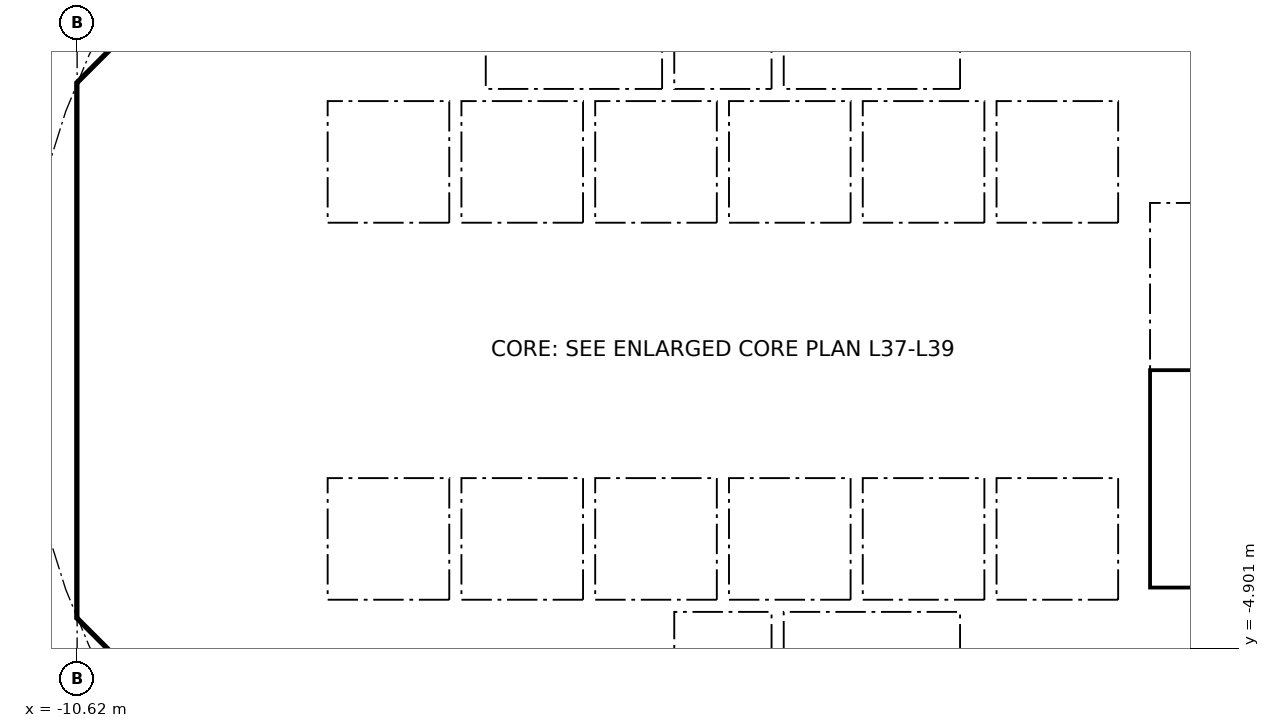
"""IFC4 building model, lengths in metres.
Left out: names, types, materials, properties, quantities, classifications, styles, units other than length and angle.
Written with IfcOpenShell. Run it as: python <this file> out.ifc"""

import sys

from ifc_helpers import new_model, si_unit, direction, frame, frame_2d, origin, place, context, subcontext, project, spatial, polyline, rectangle, outline, extrude, element, fill, save


model = new_model("IFC4")
c1 = context("Model", 3, precision=1e-05, world=origin(), true_north=direction((0.0, 1.0)))
c2 = subcontext(c1, "Body", "Model", "MODEL_VIEW")
j1 = project(units=[si_unit("LENGTHUNIT", "METRE"), si_unit("PLANEANGLEUNIT", "RADIAN")], contexts=[c1])
p1 = place(None, origin())
s1 = spatial("IfcSite", under=j1, at=p1, CompositionType="ELEMENT")
p2 = place(p1, origin())
s2 = spatial("IfcBuilding", under=s1, at=p2, CompositionType="ELEMENT")
p3 = place(p2, frame((0.0, 0.0, 149.2)))
s3 = spatial("IfcBuildingStorey", under=s2, at=p3, CompositionType="ELEMENT", Elevation=149.2)
p4 = place(p3, frame((9.988, 4.613, 0.0), z_axis=(0.0, 0.0, 1.0), x_axis=(-0.707106781187, 0.707106781187, 0.0)))
e1 = element("IfcWall", 1, at=p4, inside=s3, PredefinedType="SHEAR", context=c2, shape_type="SweptSolid", body=[
    extrude(rectangle(XDim=7.602, YDim=0.6, at=frame_2d((3.801, 0.0))), origin(), (0.0, 0.0, 1.0), 3.44),
])
p5 = place(p4, frame((3.201, 0.0, 0.0)))
e2 = element("IfcOpeningElement", 2, at=p5, cuts=e1, PredefinedType="OPENING", context=c2, shape_type="SweptSolid", body=[
    extrude(rectangle(XDim=1.2, YDim=2.1, at=frame_2d((0.6, 1.05))), frame((0.0, 0.31, 0.0), z_axis=(0.0, -1.0, 0.0), x_axis=(1.0, 0.0, 0.0)), (0.0, 0.0, 1.0), 0.62),
])
p6 = place(p3, frame((-4.613, 9.988, 0.0), z_axis=(0.0, 0.0, 1.0), x_axis=(-0.707106781187, -0.707106781187, 0.0)))
e3 = element("IfcWall", 3, at=p6, inside=s3, PredefinedType="SHEAR", context=c2, shape_type="SweptSolid", body=[
    extrude(rectangle(XDim=7.602, YDim=0.6, at=frame_2d((3.801, 0.0))), origin(), (0.0, 0.0, 1.0), 3.44),
])
p7 = place(p6, frame((0.351, 0.0, 0.0)))
e4 = element("IfcOpeningElement", 4, at=p7, cuts=e3, PredefinedType="OPENING", context=c2, shape_type="SweptSolid", body=[
    extrude(rectangle(XDim=1.1, YDim=2.1, at=frame_2d((0.55, 1.05))), frame((0.0, 0.31, 0.0), z_axis=(0.0, -1.0, 0.0), x_axis=(1.0, 0.0, 0.0)), (0.0, 0.0, 1.0), 0.62),
])
p8 = place(p3, frame((-10.325, 3.801, 0.0), z_axis=(0.0, 0.0, 1.0), x_axis=(0.0, -1.0, 0.0)))
e5 = element("IfcWall", 5, at=p8, inside=s3, PredefinedType="SHEAR", context=c2, shape_type="SweptSolid", body=[
    extrude(rectangle(XDim=7.602, YDim=0.6, at=frame_2d((3.801, 0.0))), origin(), (0.0, 0.0, 1.0), 3.44),
])
p9 = place(p8, frame((0.651, 0.0, 0.0)))
e6 = element("IfcOpeningElement", 6, at=p9, cuts=e5, PredefinedType="OPENING", context=c2, shape_type="SweptSolid", body=[
    extrude(rectangle(XDim=1.5, YDim=2.1, at=frame_2d((0.75, 1.05))), frame((0.0, 0.31, 0.0), z_axis=(0.0, -1.0, 0.0), x_axis=(1.0, 0.0, 0.0)), (0.0, 0.0, 1.0), 0.62),
])
p10 = place(p8, frame((5.451, 0.0, 0.0)))
e7 = element("IfcOpeningElement", 7, at=p10, cuts=e5, PredefinedType="OPENING", context=c2, shape_type="SweptSolid", body=[
    extrude(rectangle(XDim=1.5, YDim=2.1, at=frame_2d((0.75, 1.05))), frame((0.0, 0.31, 0.0), z_axis=(0.0, -1.0, 0.0), x_axis=(1.0, 0.0, 0.0)), (0.0, 0.0, 1.0), 0.62),
])
p11 = place(p3, frame((-9.988, -4.613, 0.0), z_axis=(0.0, 0.0, 1.0), x_axis=(0.707106781187, -0.707106781187, 0.0)))
e8 = element("IfcWall", 8, at=p11, inside=s3, PredefinedType="SHEAR", context=c2, shape_type="SweptSolid", body=[
    extrude(rectangle(XDim=7.602, YDim=0.6, at=frame_2d((3.801, 0.0))), origin(), (0.0, 0.0, 1.0), 3.44),
])
p12 = place(p11, frame((6.151, 0.0, 0.0)))
e9 = element("IfcOpeningElement", 9, at=p12, cuts=e8, PredefinedType="OPENING", context=c2, shape_type="SweptSolid", body=[
    extrude(rectangle(XDim=1.1, YDim=2.1, at=frame_2d((0.55, 1.05))), frame((0.0, 0.31, 0.0), z_axis=(0.0, -1.0, 0.0), x_axis=(1.0, 0.0, 0.0)), (0.0, 0.0, 1.0), 0.62),
])
p13 = place(p3, frame((4.613, -9.988, 0.0), z_axis=(0.0, 0.0, 1.0), x_axis=(0.707106781187, 0.707106781187, 0.0)))
e10 = element("IfcWall", 10, at=p13, inside=s3, PredefinedType="SHEAR", context=c2, shape_type="SweptSolid", body=[
    extrude(rectangle(XDim=7.602, YDim=0.6, at=frame_2d((3.801, 0.0))), origin(), (0.0, 0.0, 1.0), 3.44),
])
p14 = place(p13, frame((3.201, 0.0, 0.0)))
e11 = element("IfcOpeningElement", 11, at=p14, cuts=e10, PredefinedType="OPENING", context=c2, shape_type="SweptSolid", body=[
    extrude(rectangle(XDim=1.2, YDim=2.1, at=frame_2d((0.6, 1.05))), frame((0.0, 0.31, 0.0), z_axis=(0.0, -1.0, 0.0), x_axis=(1.0, 0.0, 0.0)), (0.0, 0.0, 1.0), 0.62),
])
p15 = place(p3, frame((-5.8, 4.3, 0.0), z_axis=(0.0, 0.0, 1.0), x_axis=(0.0, 1.0, 0.0)))
e12 = element("IfcWall", 12, at=p15, inside=s3, PredefinedType="PARTITIONING", context=c2, shape_type="SweptSolid", body=[
    extrude(rectangle(XDim=3.927, YDim=0.15, at=frame_2d((1.963, 0.0))), origin(), (0.0, 0.0, 1.0), 3.44),
])
p16 = place(p15, frame((1.551, 0.0, 0.0)))
e13 = element("IfcOpeningElement", 13, at=p16, cuts=e12, PredefinedType="OPENING", context=c2, shape_type="SweptSolid", body=[
    extrude(rectangle(XDim=0.9, YDim=2.1, at=frame_2d((0.45, 1.05))), frame((0.0, 0.085, 0.0), z_axis=(0.0, -1.0, 0.0), x_axis=(1.0, 0.0, 0.0)), (0.0, 0.0, 1.0), 0.17),
])
p17 = place(p3, frame((4.0, 4.3, 0.0), z_axis=(0.0, 0.0, 1.0), x_axis=(0.0, 1.0, 0.0)))
e14 = element("IfcWall", 14, at=p17, inside=s3, PredefinedType="SOLIDWALL", context=c2, shape_type="SweptSolid", body=[
    extrude(rectangle(XDim=2.2, YDim=0.2, at=frame_2d((1.1, 0.0))), origin(), (0.0, 0.0, 1.0), 3.44),
])
p18 = place(p17, frame((0.55, 0.0, 0.0)))
e15 = element("IfcOpeningElement", 15, at=p18, cuts=e14, PredefinedType="OPENING", context=c2, shape_type="SweptSolid", body=[
    extrude(rectangle(XDim=1.1, YDim=2.1, at=frame_2d((0.55, 1.05))), frame((0.0, 0.11, 0.0), z_axis=(0.0, -1.0, 0.0), x_axis=(1.0, 0.0, 0.0)), (0.0, 0.0, 1.0), 0.22),
])
p19 = place(p3, frame((-4.0, 4.3, 0.0), z_axis=(0.0, 0.0, 1.0), x_axis=(0.0, 1.0, 0.0)))
e16 = element("IfcWall", 16, at=p19, inside=s3, PredefinedType="SOLIDWALL", context=c2, shape_type="SweptSolid", body=[
    extrude(rectangle(XDim=2.2, YDim=0.2, at=frame_2d((1.1, 0.0))), origin(), (0.0, 0.0, 1.0), 3.44),
])
p20 = place(p19, frame((0.55, 0.0, 0.0)))
e17 = element("IfcOpeningElement", 17, at=p20, cuts=e16, PredefinedType="OPENING", context=c2, shape_type="SweptSolid", body=[
    extrude(rectangle(XDim=1.1, YDim=2.1, at=frame_2d((0.55, 1.05))), frame((0.0, 0.11, 0.0), z_axis=(0.0, -1.0, 0.0), x_axis=(1.0, 0.0, 0.0)), (0.0, 0.0, 1.0), 0.22),
])
p21 = place(p3, frame((-6.7, 2.0, 0.0), z_axis=(0.0, 0.0, 1.0), x_axis=(1.0, 0.0, 0.0)))
e18 = element("IfcWall", 18, at=p21, inside=s3, PredefinedType="SOLIDWALL", context=c2, shape_type="SweptSolid", body=[
    extrude(rectangle(XDim=13.4, YDim=0.2, at=frame_2d((6.7, 0.0))), origin(), (0.0, 0.0, 1.0), 3.44),
])
p22 = place(p21, frame((0.65, 0.0, 0.0)))
e19 = element("IfcOpeningElement", 19, at=p22, cuts=e18, PredefinedType="OPENING", context=c2, shape_type="SweptSolid", body=[
    extrude(rectangle(XDim=1.1, YDim=2.1, at=frame_2d((0.55, 1.05))), frame((0.0, 0.11, 0.0), z_axis=(0.0, -1.0, 0.0), x_axis=(1.0, 0.0, 0.0)), (0.0, 0.0, 1.0), 0.22),
])
p23 = place(p21, frame((2.85, 0.0, 0.0)))
e20 = element("IfcOpeningElement", 20, at=p23, cuts=e18, PredefinedType="OPENING", context=c2, shape_type="SweptSolid", body=[
    extrude(rectangle(XDim=1.1, YDim=2.1, at=frame_2d((0.55, 1.05))), frame((0.0, 0.11, 0.0), z_axis=(0.0, -1.0, 0.0), x_axis=(1.0, 0.0, 0.0)), (0.0, 0.0, 1.0), 0.22),
])
p24 = place(p21, frame((5.05, 0.0, 0.0)))
e21 = element("IfcOpeningElement", 21, at=p24, cuts=e18, PredefinedType="OPENING", context=c2, shape_type="SweptSolid", body=[
    extrude(rectangle(XDim=1.1, YDim=2.1, at=frame_2d((0.55, 1.05))), frame((0.0, 0.11, 0.0), z_axis=(0.0, -1.0, 0.0), x_axis=(1.0, 0.0, 0.0)), (0.0, 0.0, 1.0), 0.22),
])
p25 = place(p3, frame((6.7, 4.0, 0.0), z_axis=(0.0, 0.0, 1.0), x_axis=(1.0, 0.0, 0.0)))
e22 = element("IfcWall", 22, at=p25, inside=s3, PredefinedType="SOLIDWALL", context=c2, shape_type="SweptSolid", body=[
    extrude(rectangle(XDim=3.325, YDim=0.2, at=frame_2d((1.662, 0.0))), origin(), (0.0, 0.0, 1.0), 3.44),
])
p26 = place(p25, frame((1.25, 0.0, 0.0)))
e23 = element("IfcOpeningElement", 23, at=p26, cuts=e22, PredefinedType="OPENING", context=c2, shape_type="SweptSolid", body=[
    extrude(rectangle(XDim=1.1, YDim=2.1, at=frame_2d((0.55, 1.05))), frame((0.0, 0.11, 0.0), z_axis=(0.0, -1.0, 0.0), x_axis=(1.0, 0.0, 0.0)), (0.0, 0.0, 1.0), 0.22),
])
p27 = place(p3, frame((-7.4, -6.627, 0.0), z_axis=(0.0, 0.0, 1.0), x_axis=(0.0, 1.0, 0.0)))
e24 = element("IfcWall", 24, at=p27, inside=s3, PredefinedType="PARTITIONING", context=c2, shape_type="SweptSolid", body=[
    extrude(rectangle(XDim=2.527, YDim=0.15, at=frame_2d((1.263, 0.0))), origin(), (0.0, 0.0, 1.0), 3.44),
])
p28 = place(p27, frame((0.776, 0.0, 0.0)))
e25 = element("IfcOpeningElement", 25, at=p28, cuts=e24, PredefinedType="OPENING", context=c2, shape_type="SweptSolid", body=[
    extrude(rectangle(XDim=0.9, YDim=2.1, at=frame_2d((0.45, 1.05))), frame((0.0, 0.085, 0.0), z_axis=(0.0, -1.0, 0.0), x_axis=(1.0, 0.0, 0.0)), (0.0, 0.0, 1.0), 0.17),
])
p29 = place(p3, frame((4.0, -6.5, 0.0), z_axis=(0.0, 0.0, 1.0), x_axis=(0.0, 1.0, 0.0)))
e26 = element("IfcWall", 26, at=p29, inside=s3, PredefinedType="SOLIDWALL", context=c2, shape_type="SweptSolid", body=[
    extrude(rectangle(XDim=2.2, YDim=0.2, at=frame_2d((1.1, 0.0))), origin(), (0.0, 0.0, 1.0), 3.44),
])
p30 = place(p29, frame((0.55, 0.0, 0.0)))
e27 = element("IfcOpeningElement", 27, at=p30, cuts=e26, PredefinedType="OPENING", context=c2, shape_type="SweptSolid", body=[
    extrude(rectangle(XDim=1.1, YDim=2.1, at=frame_2d((0.55, 1.05))), frame((0.0, 0.11, 0.0), z_axis=(0.0, -1.0, 0.0), x_axis=(1.0, 0.0, 0.0)), (0.0, 0.0, 1.0), 0.22),
])
p31 = place(p3, frame((-4.0, -6.5, 0.0), z_axis=(0.0, 0.0, 1.0), x_axis=(0.0, 1.0, 0.0)))
e28 = element("IfcWall", 28, at=p31, inside=s3, PredefinedType="SOLIDWALL", context=c2, shape_type="SweptSolid", body=[
    extrude(rectangle(XDim=2.2, YDim=0.2, at=frame_2d((1.1, 0.0))), origin(), (0.0, 0.0, 1.0), 3.44),
])
p32 = place(p31, frame((0.65, 0.0, 0.0)))
e29 = element("IfcOpeningElement", 29, at=p32, cuts=e28, PredefinedType="OPENING", context=c2, shape_type="SweptSolid", body=[
    extrude(rectangle(XDim=0.9, YDim=2.1, at=frame_2d((0.45, 1.05))), frame((0.0, 0.11, 0.0), z_axis=(0.0, -1.0, 0.0), x_axis=(1.0, 0.0, 0.0)), (0.0, 0.0, 1.0), 0.22),
])
p33 = place(p3, frame((-6.7, -2.0, 0.0), z_axis=(0.0, 0.0, 1.0), x_axis=(1.0, 0.0, 0.0)))
e30 = element("IfcWall", 30, at=p33, inside=s3, PredefinedType="SOLIDWALL", context=c2, shape_type="SweptSolid", body=[
    extrude(rectangle(XDim=13.4, YDim=0.2, at=frame_2d((6.7, 0.0))), origin(), (0.0, 0.0, 1.0), 3.44),
])
p34 = place(p33, frame((0.65, 0.0, 0.0)))
e31 = element("IfcOpeningElement", 31, at=p34, cuts=e30, PredefinedType="OPENING", context=c2, shape_type="SweptSolid", body=[
    extrude(rectangle(XDim=1.1, YDim=2.1, at=frame_2d((0.55, 1.05))), frame((0.0, 0.11, 0.0), z_axis=(0.0, -1.0, 0.0), x_axis=(1.0, 0.0, 0.0)), (0.0, 0.0, 1.0), 0.22),
])
p35 = place(p33, frame((2.85, 0.0, 0.0)))
e32 = element("IfcOpeningElement", 32, at=p35, cuts=e30, PredefinedType="OPENING", context=c2, shape_type="SweptSolid", body=[
    extrude(rectangle(XDim=1.1, YDim=2.1, at=frame_2d((0.55, 1.05))), frame((0.0, 0.11, 0.0), z_axis=(0.0, -1.0, 0.0), x_axis=(1.0, 0.0, 0.0)), (0.0, 0.0, 1.0), 0.22),
])
p36 = place(p3, origin())
e33 = element("IfcWall", 33, at=p36, inside=s3, PredefinedType="SHEAR", context=c2, shape_type="SweptSolid", body=[
    extrude(outline(polyline([(-10.625, -3.801), (-10.025, -3.801), (-10.025, -4.152), (-9.776, -4.401), (-10.2, -4.825), (-10.625, -4.401), (-10.625, -3.801)])), origin(), (0.0, 0.0, 1.0), 3.44),
])
p37 = place(p3, origin())
e34 = element("IfcWall", 34, at=p37, inside=s3, PredefinedType="SHEAR", context=c2, shape_type="SweptSolid", body=[
    extrude(outline(polyline([(-10.2, 4.825), (-9.776, 4.401), (-10.025, 4.152), (-10.025, 3.801), (-10.625, 3.801), (-10.625, 4.401), (-10.2, 4.825)])), origin(), (0.0, 0.0, 1.0), 3.44),
])
for number, where, z_axis, x_axis in (
    (35, (-0.9, -6.5, 0.0), (0.0, 0.0, 1.0), (0.0, 1.0, 0.0)),
    (36, (0.9, -6.5, 0.0), (0.0, 0.0, 1.0), (0.0, 1.0, 0.0)),
):
    element("IfcWall", number, at=place(p3, frame(where, z_axis=z_axis, x_axis=x_axis)), inside=s3, PredefinedType="SOLIDWALL", context=c2, shape_type="SweptSolid", body=[
        extrude(rectangle(XDim=2.2, YDim=0.2, at=frame_2d((1.1, 0.0))), origin(), (0.0, 0.0, 1.0), 3.44),
    ])
p38 = place(p3, origin())
e37 = element("IfcWall", 37, at=p38, inside=s3, PredefinedType="SOLIDWALL", context=c2, shape_type="SweptSolid", body=[
    extrude(outline(polyline([(-6.7, -2.1), (-6.5, -2.1), (-6.5, -4.1), (-4.5, -4.1), (-4.5, -2.1), (-4.3, -2.1), (-4.3, -4.1), (-2.3, -4.1), (-2.3, -2.1), (-2.1, -2.1), (-2.1, -4.1), (-0.1, -4.1), (-0.1, -2.1), (0.1, -2.1), (0.1, -4.1), (2.1, -4.1), (2.1, -2.1), (2.3, -2.1), (2.3, -4.1), (4.3, -4.1), (4.3, -2.1), (4.5, -2.1), (4.5, -4.1), (6.5, -4.1), (6.5, -2.1), (6.7, -2.1), (6.7, -4.3), (-6.7, -4.3), (-6.7, -2.1)])), origin(), (0.0, 0.0, 1.0), 3.44),
])
for number, where, z_axis, x_axis in (
    (38, (-0.9, 4.3, 0.0), (0.0, 0.0, 1.0), (0.0, 1.0, 0.0)),
    (39, (0.9, 4.3, 0.0), (0.0, 0.0, 1.0), (0.0, 1.0, 0.0)),
):
    element("IfcWall", number, at=place(p3, frame(where, z_axis=z_axis, x_axis=x_axis)), inside=s3, PredefinedType="SOLIDWALL", context=c2, shape_type="SweptSolid", body=[
        extrude(rectangle(XDim=2.2, YDim=0.2, at=frame_2d((1.1, 0.0))), origin(), (0.0, 0.0, 1.0), 3.44),
    ])
p39 = place(p3, origin())
e40 = element("IfcWall", 40, at=p39, inside=s3, PredefinedType="SOLIDWALL", context=c2, shape_type="SweptSolid", body=[
    extrude(outline(polyline([(-6.5, 2.1), (-6.7, 2.1), (-6.7, 4.3), (6.7, 4.3), (6.7, 2.1), (6.5, 2.1), (6.5, 4.1), (4.5, 4.1), (4.5, 2.1), (4.3, 2.1), (4.3, 4.1), (2.3, 4.1), (2.3, 2.1), (2.1, 2.1), (2.1, 4.1), (0.1, 4.1), (0.1, 2.1), (-0.1, 2.1), (-0.1, 4.1), (-2.1, 4.1), (-2.1, 2.1), (-2.3, 2.1), (-2.3, 4.1), (-4.3, 4.1), (-4.3, 2.1), (-4.5, 2.1), (-4.5, 4.1), (-6.5, 4.1), (-6.5, 2.1)])), origin(), (0.0, 0.0, 1.0), 3.44),
])
for number, where, z_axis, x_axis in (
    (41, (-10.025, -4.0, 0.0), (0.0, 0.0, 1.0), (1.0, 0.0, 0.0)),
    (42, (-10.025, 4.0, 0.0), (0.0, 0.0, 1.0), (1.0, 0.0, 0.0)),
):
    element("IfcWall", number, at=place(p3, frame(where, z_axis=z_axis, x_axis=x_axis)), inside=s3, PredefinedType="PARTITIONING", context=c2, shape_type="SweptSolid", body=[
        extrude(rectangle(XDim=3.325, YDim=0.2, at=frame_2d((1.662, 0.0))), origin(), (0.0, 0.0, 1.0), 3.44),
    ])
p40 = place(p3, origin())
e43 = element("IfcWall", 43, at=p40, inside=s3, PredefinedType="SOLIDWALL", context=c2, shape_type="SweptSolid", body=[
    extrude(outline(polyline([(7.025, -3.9), (6.7, -3.9), (6.7, 3.9), (7.025, 3.9), (7.025, -3.9)])), origin(), (0.0, 0.0, 1.0), 3.44),
])
p41 = place(p3, origin())
e44 = element("IfcWall", 44, at=p41, inside=s3, PredefinedType="SOLIDWALL", context=c2, shape_type="SweptSolid", body=[
    extrude(outline(polyline([(10.025, -4.1), (6.7, -4.1), (6.7, -3.9), (10.025, -3.9), (10.025, -4.1)])), origin(), (0.0, 0.0, 1.0), 3.44),
])
p42 = place(p22, origin())
e45 = element("IfcDoor", 45, at=p42, inside=s3, OperationType="DOUBLE_DOOR_SLIDING", PredefinedType="DOOR", context=c2, shape_type="SweptSolid", body=[
    extrude(rectangle(XDim=1.1, YDim=2.1, at=frame_2d((0.55, 1.05))), frame((0.0, 0.025, 0.0), z_axis=(0.0, -1.0, 0.0), x_axis=(1.0, 0.0, 0.0)), (0.0, 0.0, 1.0), 0.05),
])
fill(e19, e45)
p43 = place(p23, origin())
e46 = element("IfcDoor", 46, at=p43, inside=s3, OperationType="DOUBLE_DOOR_SLIDING", PredefinedType="DOOR", context=c2, shape_type="SweptSolid", body=[
    extrude(rectangle(XDim=1.1, YDim=2.1, at=frame_2d((0.55, 1.05))), frame((0.0, 0.025, 0.0), z_axis=(0.0, -1.0, 0.0), x_axis=(1.0, 0.0, 0.0)), (0.0, 0.0, 1.0), 0.05),
])
fill(e20, e46)
p44 = place(p24, origin())
e47 = element("IfcDoor", 47, at=p44, inside=s3, OperationType="DOUBLE_DOOR_SLIDING", PredefinedType="DOOR", context=c2, shape_type="SweptSolid", body=[
    extrude(rectangle(XDim=1.1, YDim=2.1, at=frame_2d((0.55, 1.05))), frame((0.0, 0.025, 0.0), z_axis=(0.0, -1.0, 0.0), x_axis=(1.0, 0.0, 0.0)), (0.0, 0.0, 1.0), 0.05),
])
fill(e21, e47)
p45 = place(p34, origin())
e48 = element("IfcDoor", 48, at=p45, inside=s3, OperationType="DOUBLE_DOOR_SLIDING", PredefinedType="DOOR", context=c2, shape_type="SweptSolid", body=[
    extrude(rectangle(XDim=1.1, YDim=2.1, at=frame_2d((0.55, 1.05))), frame((0.0, 0.025, 0.0), z_axis=(0.0, -1.0, 0.0), x_axis=(1.0, 0.0, 0.0)), (0.0, 0.0, 1.0), 0.05),
])
fill(e31, e48)
p46 = place(p35, origin())
e49 = element("IfcDoor", 49, at=p46, inside=s3, OperationType="DOUBLE_DOOR_SLIDING", PredefinedType="DOOR", context=c2, shape_type="SweptSolid", body=[
    extrude(rectangle(XDim=1.1, YDim=2.1, at=frame_2d((0.55, 1.05))), frame((0.0, 0.025, 0.0), z_axis=(0.0, -1.0, 0.0), x_axis=(1.0, 0.0, 0.0)), (0.0, 0.0, 1.0), 0.05),
])
fill(e32, e49)
p47 = place(p18, origin())
e50 = element("IfcDoor", 50, at=p47, inside=s3, OperationType="DOUBLE_DOOR_SLIDING", PredefinedType="DOOR", context=c2, shape_type="SweptSolid", body=[
    extrude(rectangle(XDim=1.1, YDim=2.1, at=frame_2d((0.55, 1.05))), frame((0.0, 0.025, 0.0), z_axis=(0.0, -1.0, 0.0), x_axis=(1.0, 0.0, 0.0)), (0.0, 0.0, 1.0), 0.05),
])
fill(e15, e50)
p48 = place(p30, origin())
e51 = element("IfcDoor", 51, at=p48, inside=s3, OperationType="DOUBLE_DOOR_SLIDING", PredefinedType="DOOR", context=c2, shape_type="SweptSolid", body=[
    extrude(rectangle(XDim=1.1, YDim=2.1, at=frame_2d((0.55, 1.05))), frame((0.0, 0.025, 0.0), z_axis=(0.0, -1.0, 0.0), x_axis=(1.0, 0.0, 0.0)), (0.0, 0.0, 1.0), 0.05),
])
fill(e27, e51)
p49 = place(p20, origin())
e52 = element("IfcDoor", 52, at=p49, inside=s3, OperationType="DOUBLE_DOOR_SLIDING", PredefinedType="DOOR", context=c2, shape_type="SweptSolid", body=[
    extrude(rectangle(XDim=1.1, YDim=2.1, at=frame_2d((0.55, 1.05))), frame((0.0, 0.025, 0.0), z_axis=(0.0, -1.0, 0.0), x_axis=(1.0, 0.0, 0.0)), (0.0, 0.0, 1.0), 0.05),
])
fill(e17, e52)
p50 = place(p9, origin())
e53 = element("IfcDoor", 53, at=p50, inside=s3, OperationType="DOUBLE_DOOR_SINGLE_SWING", PredefinedType="DOOR", context=c2, shape_type="SweptSolid", body=[
    extrude(rectangle(XDim=1.5, YDim=2.1, at=frame_2d((0.75, 1.05))), frame((0.0, 0.025, 0.0), z_axis=(0.0, -1.0, 0.0), x_axis=(1.0, 0.0, 0.0)), (0.0, 0.0, 1.0), 0.05),
])
fill(e6, e53)
p51 = place(p10, origin())
e54 = element("IfcDoor", 54, at=p51, inside=s3, OperationType="DOUBLE_DOOR_SINGLE_SWING", PredefinedType="DOOR", context=c2, shape_type="SweptSolid", body=[
    extrude(rectangle(XDim=1.5, YDim=2.1, at=frame_2d((0.75, 1.05))), frame((0.0, 0.025, 0.0), z_axis=(0.0, -1.0, 0.0), x_axis=(1.0, 0.0, 0.0)), (0.0, 0.0, 1.0), 0.05),
])
fill(e7, e54)
save(model, sys.argv[1])
